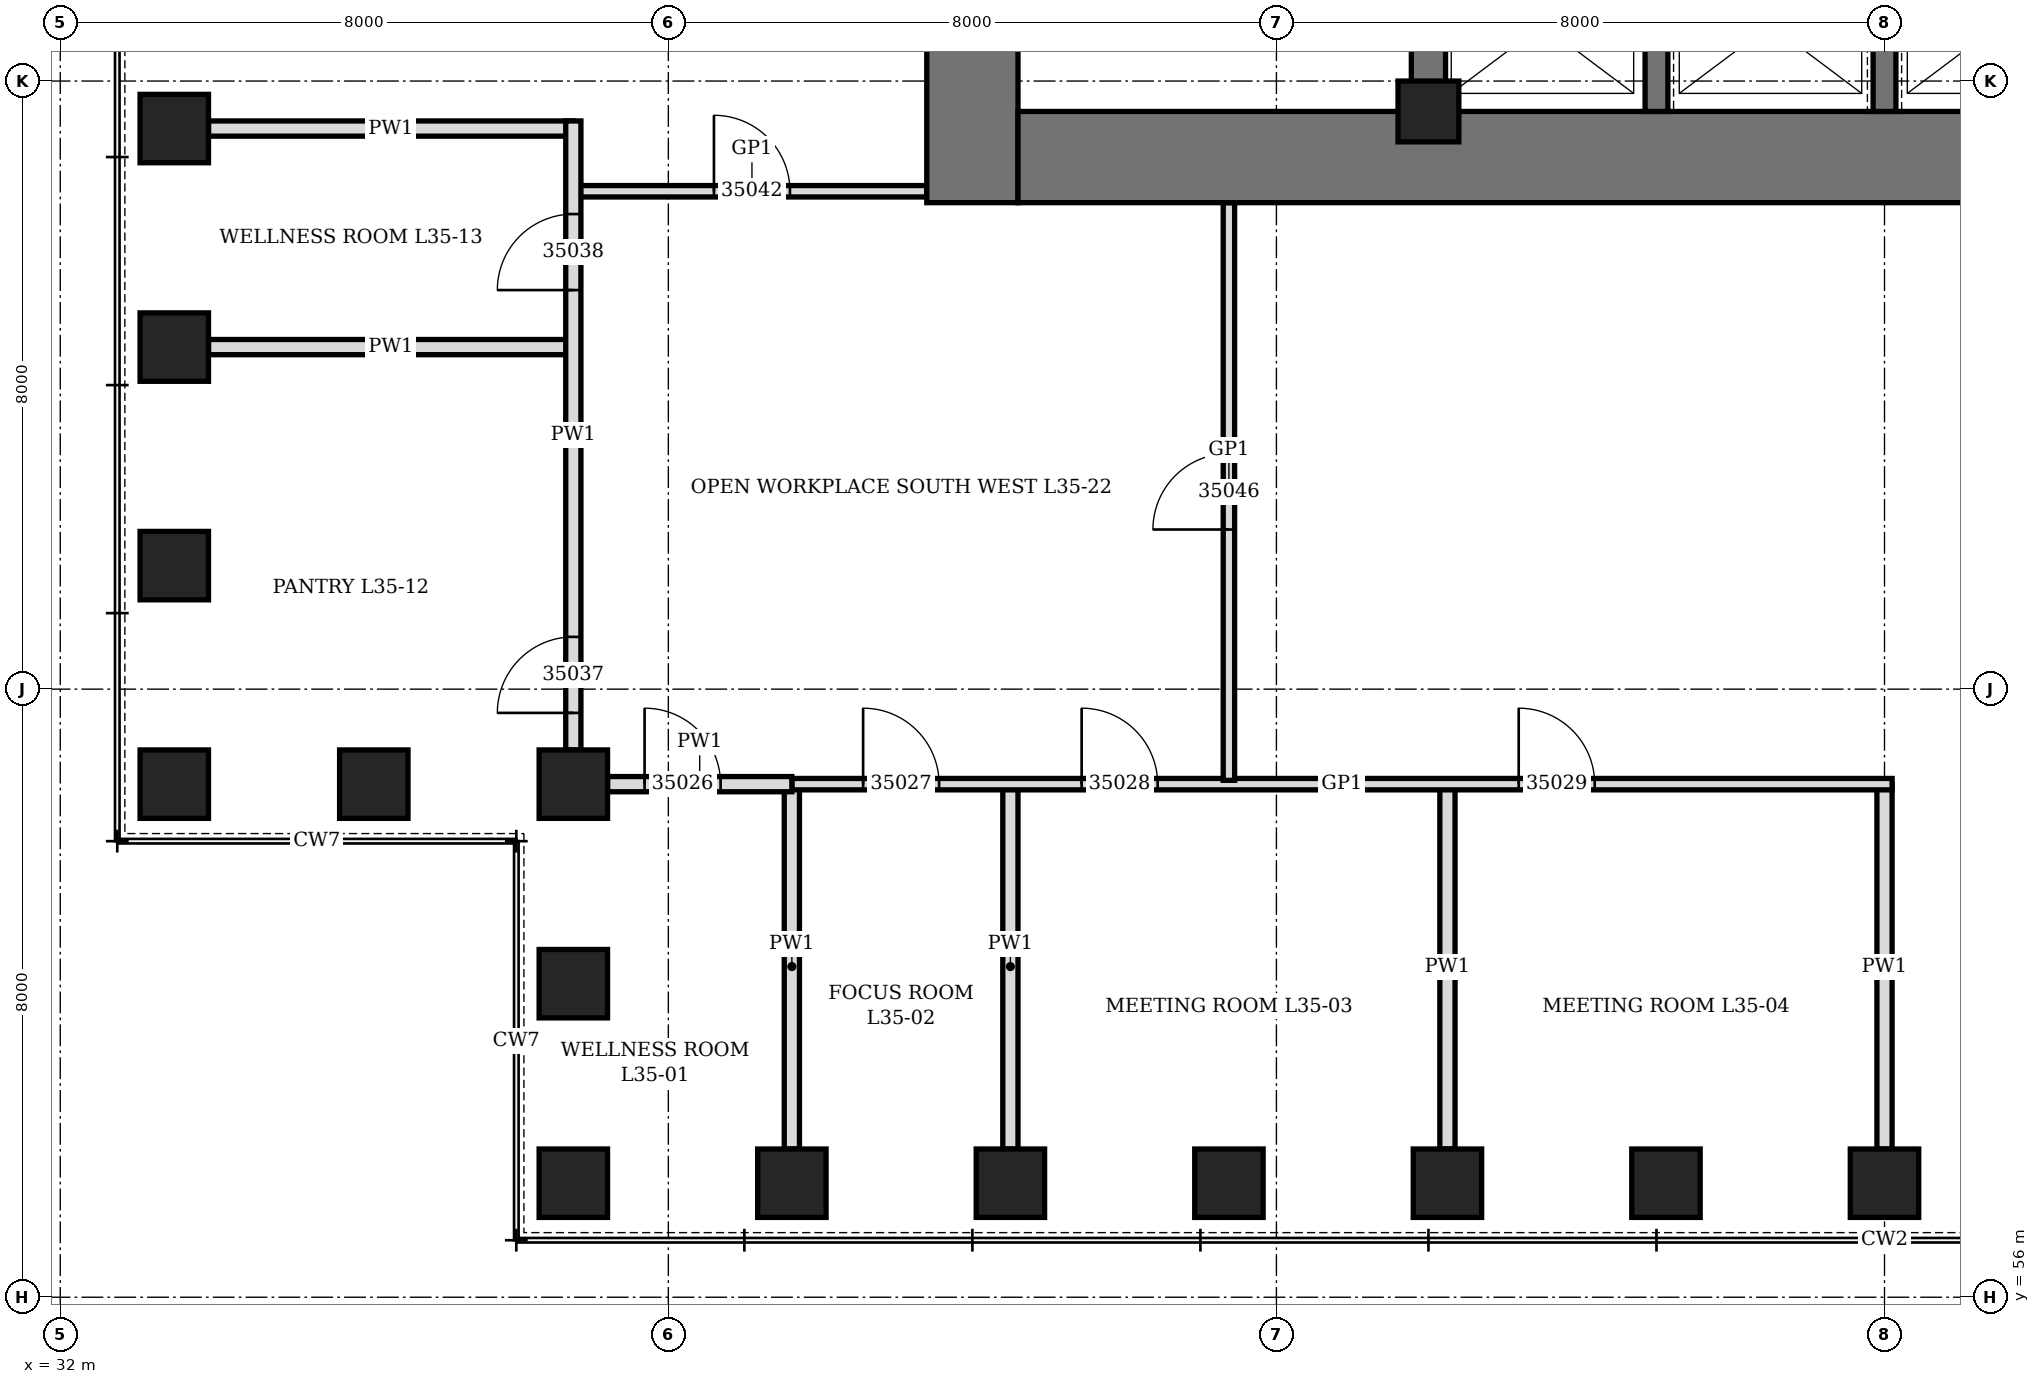
"""IFC4 building model, lengths in metres.
Left out: names, types, materials, properties, quantities, classifications, styles, units other than length and angle.
Written with IfcOpenShell. Run it as: python <this file> out.ifc"""

import sys

from ifc_helpers import new_model, si_unit, direction, frame, frame_2d, origin, origin_2d, place, context, subcontext, project, spatial, rectangle, hollow_rectangle, extrude, element, fill, save


model = new_model("IFC4")
c1 = context("Model", 3, precision=1e-05, world=origin(), true_north=direction((0.0, 1.0)))
c2 = subcontext(c1, "Body", "Model", "MODEL_VIEW")
j1 = project(units=[si_unit("LENGTHUNIT", "METRE"), si_unit("PLANEANGLEUNIT", "RADIAN")], contexts=[c1])
p1 = place(None, origin())
s1 = spatial("IfcSite", under=j1, at=p1, CompositionType="ELEMENT")
p2 = place(p1, origin())
s2 = spatial("IfcBuilding", under=s1, at=p2, CompositionType="ELEMENT")
p3 = place(p2, frame((0.0, 0.0, 158.5)))
s3 = spatial("IfcBuildingStorey", under=s2, at=p3, CompositionType="ELEMENT", Elevation=158.5)
for number, where, z_axis, x_axis in (
    (1, (38.75, 57.5, 0.0), (0.0, 0.0, 1.0), (1.0, 0.0, 0.0)),
    (2, (41.625, 57.5, 0.0), (0.0, 0.0, 1.0), (1.0, 0.0, 0.0)),
    (3, (44.5, 57.5, 0.0), (0.0, 0.0, 1.0), (1.0, 0.0, 0.0)),
    (4, (47.375, 57.5, 0.0), (0.0, 0.0, 1.0), (1.0, 0.0, 0.0)),
    (5, (50.25, 57.5, 0.0), (0.0, 0.0, 1.0), (1.0, 0.0, 0.0)),
    (6, (53.125, 57.5, 0.0), (0.0, 0.0, 1.0), (1.0, 0.0, 0.0)),
    (7, (56.0, 57.5, 0.0), (0.0, 0.0, 1.0), (1.0, 0.0, 0.0)),
    (8, (33.5, 71.375, 0.0), (0.0, 0.0, 1.0), (0.0, 1.0, 0.0)),
    (9, (33.5, 68.5, 0.0), (0.0, 0.0, 1.0), (0.0, 1.0, 0.0)),
    (10, (33.5, 65.625, 0.0), (0.0, 0.0, 1.0), (0.0, 1.0, 0.0)),
    (11, (33.5, 62.75, 0.0), (0.0, 0.0, 1.0), (1.0, 0.0, 0.0)),
    (12, (36.125, 62.75, 0.0), (0.0, 0.0, 1.0), (1.0, 0.0, 0.0)),
    (13, (38.75, 62.75, 0.0), (0.0, 0.0, 1.0), (0.0, 1.0, 0.0)),
    (14, (38.75, 60.125, 0.0), (0.0, 0.0, 1.0), (0.0, 1.0, 0.0)),
):
    element("IfcColumn", number, at=place(p3, frame(where, z_axis=z_axis, x_axis=x_axis)), inside=s3, PredefinedType="COLUMN", context=c2, shape_type="SweptSolid", body=[
        extrude(hollow_rectangle(XDim=0.9, YDim=0.9, WallThickness=0.12, at=origin_2d()), origin(), (0.0, 0.0, 1.0), 4.2),
    ])
p4 = place(p3, frame((44.0, 70.4, 0.0), z_axis=(0.0, 0.0, 1.0), x_axis=(0.0, 1.0, 0.0)))
e15 = element("IfcWall", 15, at=p4, inside=s3, PredefinedType="SHEAR", context=c2, shape_type="SweptSolid", body=[
    extrude(rectangle(XDim=19.2, YDim=1.2, at=frame_2d((9.6, 0.0))), origin(), (0.0, 0.0, 1.0), 4.2),
])
p5 = place(p4, frame((8.6, 0.0, 0.0)))
e16 = element("IfcOpeningElement", 16, at=p5, cuts=e15, PredefinedType="OPENING", context=c2, shape_type="SweptSolid", body=[
    extrude(rectangle(XDim=2.0, YDim=2.4, at=frame_2d((1.0, 1.2))), frame((0.0, 0.61, 0.0), z_axis=(0.0, -1.0, 0.0), x_axis=(1.0, 0.0, 0.0)), (0.0, 0.0, 1.0), 1.22),
])
p6 = place(p3, frame((44.6, 71.0, 0.0), z_axis=(0.0, 0.0, 1.0), x_axis=(1.0, 0.0, 0.0)))
e17 = element("IfcWall", 17, at=p6, inside=s3, PredefinedType="SHEAR", context=c2, shape_type="SweptSolid", body=[
    extrude(rectangle(XDim=22.8, YDim=1.2, at=frame_2d((11.4, 0.0))), origin(), (0.0, 0.0, 1.0), 4.2),
])
p7 = place(p3, frame((50.0, 71.6, 0.0), z_axis=(0.0, 0.0, 1.0), x_axis=(0.0, 1.0, 0.0)))
e18 = element("IfcWall", 18, at=p7, inside=s3, PredefinedType="SHEAR", context=c2, shape_type="SweptSolid", body=[
    extrude(rectangle(XDim=16.8, YDim=0.45, at=frame_2d((8.4, 0.0))), origin(), (0.0, 0.0, 1.0), 4.2),
])
p8 = place(p7, frame((7.5, 0.0, 0.0)))
e19 = element("IfcOpeningElement", 19, at=p8, cuts=e18, PredefinedType="OPENING", context=c2, shape_type="SweptSolid", body=[
    extrude(rectangle(XDim=1.8, YDim=2.4, at=frame_2d((0.9, 1.2))), frame((0.0, 0.235, 0.0), z_axis=(0.0, -1.0, 0.0), x_axis=(1.0, 0.0, 0.0)), (0.0, 0.0, 1.0), 0.47),
])
for number, where, z_axis, x_axis in (
    (20, (53.0, 71.6, 0.0), (0.0, 0.0, 1.0), (0.0, 1.0, 0.0)),
    (21, (56.0, 71.6, 0.0), (0.0, 0.0, 1.0), (0.0, 1.0, 0.0)),
):
    element("IfcWall", number, at=place(p3, frame(where, z_axis=z_axis, x_axis=x_axis)), inside=s3, PredefinedType="SHEAR", context=c2, shape_type="SweptSolid", body=[
        extrude(rectangle(XDim=2.25, YDim=0.3, at=frame_2d((1.125, 0.0))), origin(), (0.0, 0.0, 1.0), 4.2),
    ])
p9 = place(p3, frame((50.0, 71.6, 0.0), z_axis=(0.0, 0.0, 1.0), x_axis=(1.0, 0.0, 0.0)))
e22 = element("IfcColumn", 22, at=p9, inside=s3, PredefinedType="COLUMN", context=c2, shape_type="SweptSolid", body=[
    extrude(hollow_rectangle(XDim=0.8, YDim=0.8, WallThickness=0.1, at=origin_2d()), origin(), (0.0, 0.0, 1.0), 4.2),
])
p10 = place(p3, frame((41.625, 57.95, 0.0), z_axis=(0.0, 0.0, 1.0), x_axis=(0.0, 1.0, 0.0)))
e23 = element("IfcWall", 23, at=p10, inside=s3, PredefinedType="PARTITIONING", context=c2, shape_type="SweptSolid", body=[
    extrude(rectangle(XDim=4.8, YDim=0.2, at=frame_2d((2.4, 0.0))), origin(), (0.0, 0.0, 1.0), 3.428),
])
p11 = place(p3, frame((44.5, 57.95, 0.0), z_axis=(0.0, 0.0, 1.0), x_axis=(0.0, 1.0, 0.0)))
e24 = element("IfcWall", 24, at=p11, inside=s3, PredefinedType="PARTITIONING", context=c2, shape_type="SweptSolid", body=[
    extrude(rectangle(XDim=4.8, YDim=0.2, at=frame_2d((2.4, 0.0))), origin(), (0.0, 0.0, 1.0), 2.74),
])
for number, where, z_axis, x_axis in (
    (25, (50.25, 57.95, 0.0), (0.0, 0.0, 1.0), (0.0, 1.0, 0.0)),
    (26, (56.0, 57.95, 0.0), (0.0, 0.0, 1.0), (0.0, 1.0, 0.0)),
):
    element("IfcWall", number, at=place(p3, frame(where, z_axis=z_axis, x_axis=x_axis)), inside=s3, PredefinedType="PARTITIONING", context=c2, shape_type="SweptSolid", body=[
        extrude(rectangle(XDim=4.8, YDim=0.2, at=frame_2d((2.4, 0.0))), origin(), (0.0, 0.0, 1.0), 3.278),
    ])
for number, where, z_axis, x_axis in (
    (27, (33.95, 68.5, 0.0), (0.0, 0.0, 1.0), (1.0, 0.0, 0.0)),
    (28, (33.95, 71.375, 0.0), (0.0, 0.0, 1.0), (1.0, 0.0, 0.0)),
):
    element("IfcWall", number, at=place(p3, frame(where, z_axis=z_axis, x_axis=x_axis)), inside=s3, PredefinedType="PARTITIONING", context=c2, shape_type="SweptSolid", body=[
        extrude(rectangle(XDim=4.8, YDim=0.2, at=frame_2d((2.4, 0.0))), origin(), (0.0, 0.0, 1.0), 3.428),
    ])
p12 = place(p3, frame((41.625, 62.75, 0.0), z_axis=(0.0, 0.0, 1.0), x_axis=(1.0, 0.0, 0.0)))
e29 = element("IfcWall", 29, at=p12, inside=s3, PredefinedType="PARTITIONING", context=c2, shape_type="SweptSolid", body=[
    extrude(rectangle(XDim=14.475, YDim=0.15, at=frame_2d((7.238, 0.0))), origin(), (0.0, 0.0, 1.0), 4.04),
])
p13 = place(p12, frame((0.938, 0.0, 0.0)))
e30 = element("IfcOpeningElement", 30, at=p13, cuts=e29, PredefinedType="OPENING", context=c2, shape_type="SweptSolid", body=[
    extrude(rectangle(XDim=1.0, YDim=2.4, at=frame_2d((0.5, 1.2))), frame((0.0, 0.085, 0.0), z_axis=(0.0, -1.0, 0.0), x_axis=(1.0, 0.0, 0.0)), (0.0, 0.0, 1.0), 0.17),
])
p14 = place(p12, frame((3.812, 0.0, 0.0)))
e31 = element("IfcOpeningElement", 31, at=p14, cuts=e29, PredefinedType="OPENING", context=c2, shape_type="SweptSolid", body=[
    extrude(rectangle(XDim=1.0, YDim=2.4, at=frame_2d((0.5, 1.2))), frame((0.0, 0.085, 0.0), z_axis=(0.0, -1.0, 0.0), x_axis=(1.0, 0.0, 0.0)), (0.0, 0.0, 1.0), 0.17),
])
p15 = place(p12, frame((9.562, 0.0, 0.0)))
e32 = element("IfcOpeningElement", 32, at=p15, cuts=e29, PredefinedType="OPENING", context=c2, shape_type="SweptSolid", body=[
    extrude(rectangle(XDim=1.0, YDim=2.4, at=frame_2d((0.5, 1.2))), frame((0.0, 0.085, 0.0), z_axis=(0.0, -1.0, 0.0), x_axis=(1.0, 0.0, 0.0)), (0.0, 0.0, 1.0), 0.17),
])
p16 = place(p3, frame((39.2, 62.75, 0.0), z_axis=(0.0, 0.0, 1.0), x_axis=(1.0, 0.0, 0.0)))
e33 = element("IfcWall", 33, at=p16, inside=s3, PredefinedType="PARTITIONING", context=c2, shape_type="SweptSolid", body=[
    extrude(rectangle(XDim=2.425, YDim=0.2, at=frame_2d((1.212, 0.0))), origin(), (0.0, 0.0, 1.0), 4.04),
])
p17 = place(p16, frame((0.488, 0.0, 0.0)))
e34 = element("IfcOpeningElement", 34, at=p17, cuts=e33, PredefinedType="OPENING", context=c2, shape_type="SweptSolid", body=[
    extrude(rectangle(XDim=1.0, YDim=2.1, at=frame_2d((0.5, 1.05))), frame((0.0, 0.11, 0.0), z_axis=(0.0, -1.0, 0.0), x_axis=(1.0, 0.0, 0.0)), (0.0, 0.0, 1.0), 0.22),
])
p18 = place(p3, frame((38.8, 70.55, 0.0), z_axis=(0.0, 0.0, 1.0), x_axis=(1.0, 0.0, 0.0)))
e35 = element("IfcWall", 35, at=p18, inside=s3, PredefinedType="PARTITIONING", context=c2, shape_type="SweptSolid", body=[
    extrude(rectangle(XDim=4.6, YDim=0.15, at=frame_2d((2.3, 0.0))), origin(), (0.0, 0.0, 1.0), 4.04),
])
p19 = place(p18, frame((1.8, 0.0, 0.0)))
e36 = element("IfcOpeningElement", 36, at=p19, cuts=e35, PredefinedType="OPENING", context=c2, shape_type="SweptSolid", body=[
    extrude(rectangle(XDim=1.0, YDim=2.4, at=frame_2d((0.5, 1.2))), frame((0.0, 0.085, 0.0), z_axis=(0.0, -1.0, 0.0), x_axis=(1.0, 0.0, 0.0)), (0.0, 0.0, 1.0), 0.17),
])
p20 = place(p3, frame((38.75, 63.2, 0.0), z_axis=(0.0, 0.0, 1.0), x_axis=(0.0, 1.0, 0.0)))
e37 = element("IfcWall", 37, at=p20, inside=s3, PredefinedType="PARTITIONING", context=c2, shape_type="SweptSolid", body=[
    extrude(rectangle(XDim=8.275, YDim=0.2, at=frame_2d((4.138, 0.0))), origin(), (0.0, 0.0, 1.0), 4.04),
])
p21 = place(p20, frame((0.488, 0.0, 0.0)))
e38 = element("IfcOpeningElement", 38, at=p21, cuts=e37, PredefinedType="OPENING", context=c2, shape_type="SweptSolid", body=[
    extrude(rectangle(XDim=1.0, YDim=2.1, at=frame_2d((0.5, 1.05))), frame((0.0, 0.11, 0.0), z_axis=(0.0, -1.0, 0.0), x_axis=(1.0, 0.0, 0.0)), (0.0, 0.0, 1.0), 0.22),
])
p22 = place(p20, frame((6.05, 0.0, 0.0)))
e39 = element("IfcOpeningElement", 39, at=p22, cuts=e37, PredefinedType="OPENING", context=c2, shape_type="SweptSolid", body=[
    extrude(rectangle(XDim=1.0, YDim=2.1, at=frame_2d((0.5, 1.05))), frame((0.0, 0.11, 0.0), z_axis=(0.0, -1.0, 0.0), x_axis=(1.0, 0.0, 0.0)), (0.0, 0.0, 1.0), 0.22),
])
p23 = place(p3, frame((47.375, 62.8, 0.0), z_axis=(0.0, 0.0, 1.0), x_axis=(0.0, 1.0, 0.0)))
e40 = element("IfcWall", 40, at=p23, inside=s3, PredefinedType="PARTITIONING", context=c2, shape_type="SweptSolid", body=[
    extrude(rectangle(XDim=7.6, YDim=0.15, at=frame_2d((3.8, 0.0))), origin(), (0.0, 0.0, 1.0), 3.278),
])
p24 = place(p23, frame((3.3, 0.0, 0.0)))
e41 = element("IfcOpeningElement", 41, at=p24, cuts=e40, PredefinedType="OPENING", context=c2, shape_type="SweptSolid", body=[
    extrude(rectangle(XDim=1.0, YDim=2.4, at=frame_2d((0.5, 1.2))), frame((0.0, 0.085, 0.0), z_axis=(0.0, -1.0, 0.0), x_axis=(1.0, 0.0, 0.0)), (0.0, 0.0, 1.0), 0.17),
])
p25 = place(p17, origin())
e42 = element("IfcDoor", 42, at=p25, inside=s3, OperationType="SINGLE_SWING_LEFT", PredefinedType="DOOR", context=c2, shape_type="SweptSolid", body=[
    extrude(rectangle(XDim=1.0, YDim=2.1, at=frame_2d((0.5, 1.05))), frame((0.0, 0.1, 0.0), z_axis=(0.0, -1.0, 0.0), x_axis=(1.0, 0.0, 0.0)), (0.0, 0.0, 1.0), 0.199),
])
fill(e34, e42)
p26 = place(p13, origin())
e43 = element("IfcDoor", 43, at=p26, inside=s3, OperationType="SINGLE_SWING_RIGHT", PredefinedType="DOOR", context=c2, shape_type="SweptSolid", body=[
    extrude(rectangle(XDim=1.0, YDim=2.4, at=frame_2d((0.5, 1.2))), frame((0.0, 0.075, 0.0), z_axis=(0.0, -1.0, 0.0), x_axis=(1.0, 0.0, 0.0)), (0.0, 0.0, 1.0), 0.149),
])
fill(e30, e43)
p27 = place(p14, origin())
e44 = element("IfcDoor", 44, at=p27, inside=s3, OperationType="SINGLE_SWING_RIGHT", PredefinedType="DOOR", context=c2, shape_type="SweptSolid", body=[
    extrude(rectangle(XDim=1.0, YDim=2.4, at=frame_2d((0.5, 1.2))), frame((0.0, 0.075, 0.0), z_axis=(0.0, -1.0, 0.0), x_axis=(1.0, 0.0, 0.0)), (0.0, 0.0, 1.0), 0.149),
])
fill(e31, e44)
p28 = place(p15, origin())
e45 = element("IfcDoor", 45, at=p28, inside=s3, OperationType="SINGLE_SWING_RIGHT", PredefinedType="DOOR", context=c2, shape_type="SweptSolid", body=[
    extrude(rectangle(XDim=1.0, YDim=2.4, at=frame_2d((0.5, 1.2))), frame((0.0, 0.075, 0.0), z_axis=(0.0, -1.0, 0.0), x_axis=(1.0, 0.0, 0.0)), (0.0, 0.0, 1.0), 0.149),
])
fill(e32, e45)
p29 = place(p21, origin())
e46 = element("IfcDoor", 46, at=p29, inside=s3, OperationType="SINGLE_SWING_LEFT", PredefinedType="DOOR", context=c2, shape_type="SweptSolid", body=[
    extrude(rectangle(XDim=1.0, YDim=2.1, at=frame_2d((0.5, 1.05))), frame((0.0, 0.1, 0.0), z_axis=(0.0, -1.0, 0.0), x_axis=(1.0, 0.0, 0.0)), (0.0, 0.0, 1.0), 0.199),
])
fill(e38, e46)
p30 = place(p22, origin())
e47 = element("IfcDoor", 47, at=p30, inside=s3, OperationType="SINGLE_SWING_LEFT", PredefinedType="DOOR", context=c2, shape_type="SweptSolid", body=[
    extrude(rectangle(XDim=1.0, YDim=2.1, at=frame_2d((0.5, 1.05))), frame((0.0, 0.1, 0.0), z_axis=(0.0, -1.0, 0.0), x_axis=(1.0, 0.0, 0.0)), (0.0, 0.0, 1.0), 0.199),
])
fill(e39, e47)
p31 = place(p19, origin())
e48 = element("IfcDoor", 48, at=p31, inside=s3, OperationType="SINGLE_SWING_RIGHT", PredefinedType="DOOR", context=c2, shape_type="SweptSolid", body=[
    extrude(rectangle(XDim=1.0, YDim=2.4, at=frame_2d((0.5, 1.2))), frame((0.0, 0.075, 0.0), z_axis=(0.0, -1.0, 0.0), x_axis=(1.0, 0.0, 0.0)), (0.0, 0.0, 1.0), 0.149),
])
fill(e36, e48)
p32 = place(p24, origin())
e49 = element("IfcDoor", 49, at=p32, inside=s3, OperationType="SINGLE_SWING_RIGHT", PredefinedType="DOOR", context=c2, shape_type="SweptSolid", body=[
    extrude(rectangle(XDim=1.0, YDim=2.4, at=frame_2d((0.5, 1.2))), frame((0.0, 0.075, 0.0), z_axis=(0.0, -1.0, 0.0), x_axis=(1.0, 0.0, 0.0)), (0.0, 0.0, 1.0), 0.149),
])
fill(e41, e49)
save(model, sys.argv[1])
